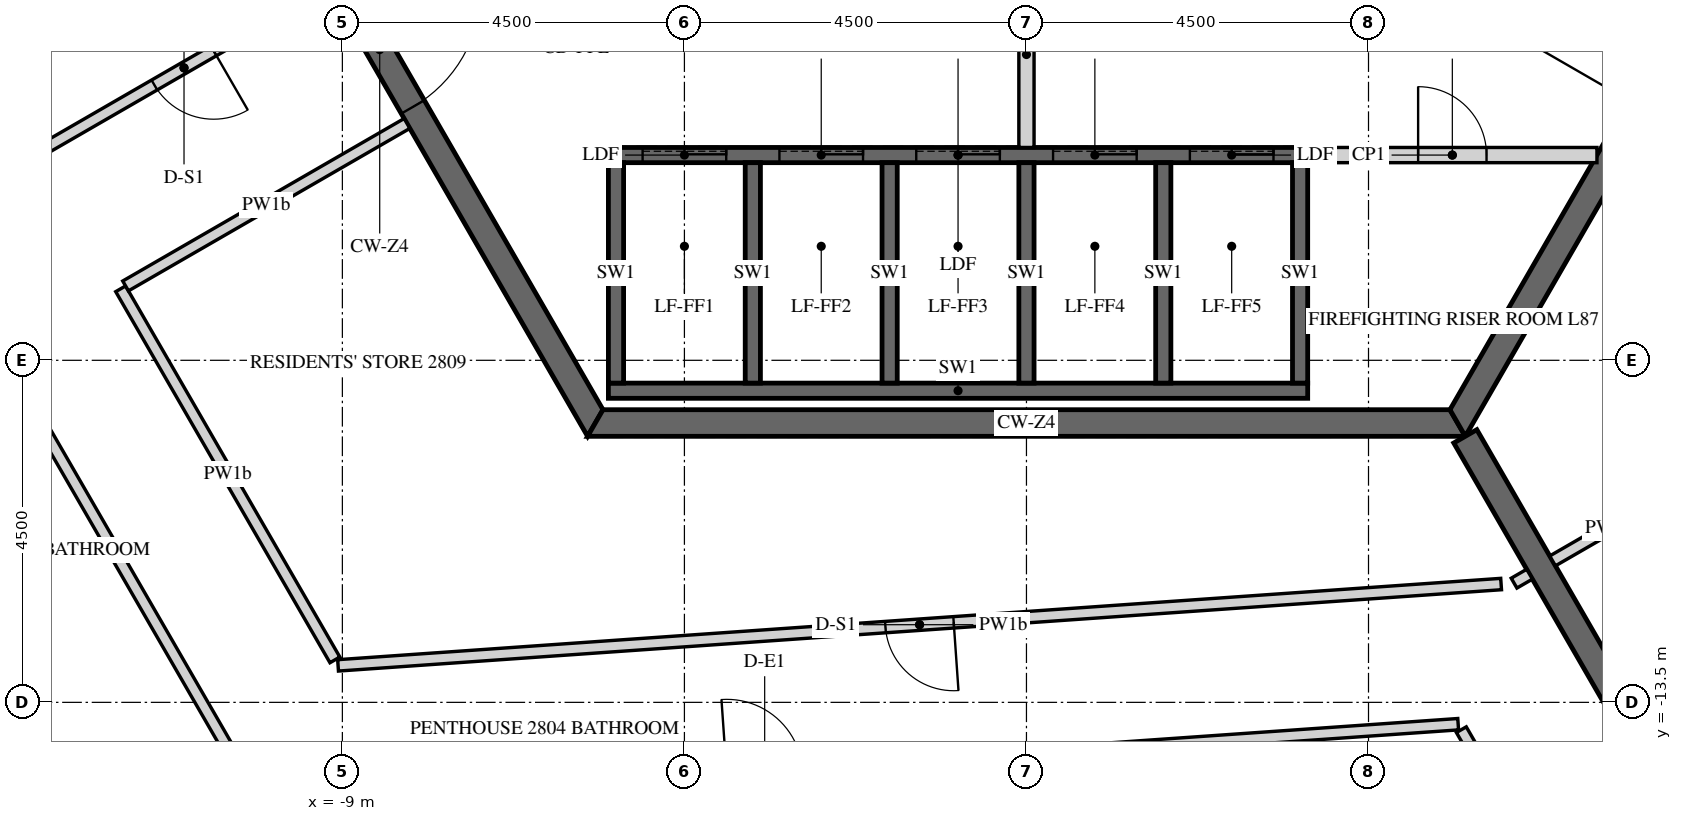
"""IFC4 building model, lengths in metres.
Left out: names, types, materials, properties, quantities, classifications, styles, units other than length and angle.
Written with IfcOpenShell. Run it as: python <this file> out.ifc"""

import sys

from ifc_helpers import new_model, si_unit, direction, frame, frame_2d, origin, place, context, subcontext, project, spatial, polyline, rectangle, outline, extrude, element, fill, save


model = new_model("IFC4")
c1 = context("Model", 3, precision=1e-05, world=origin(), true_north=direction((0.0, 1.0)))
c2 = subcontext(c1, "Body", "Model", "MODEL_VIEW")
j1 = project(units=[si_unit("LENGTHUNIT", "METRE"), si_unit("PLANEANGLEUNIT", "RADIAN")], contexts=[c1])
p1 = place(None, origin())
s1 = spatial("IfcSite", under=j1, at=p1, CompositionType="ELEMENT")
p2 = place(p1, origin())
s2 = spatial("IfcBuilding", under=s1, at=p2, CompositionType="ELEMENT")
p3 = place(p2, frame((0.0, 0.0, 361.2)))
s3 = spatial("IfcBuildingStorey", under=s2, at=p3, CompositionType="ELEMENT", Elevation=361.2)
p4 = place(p3, frame((-11.345, 0.0, -0.15), z_axis=(0.0, 0.0, 1.0), x_axis=(0.499995046907, -0.866028263435, 0.0)))
e1 = element("IfcWall", 1, at=p4, inside=s3, PredefinedType="SHEAR", context=c2, shape_type="SweptSolid", body=[
    extrude(outline(polyline([(-0.101, -0.175), (11.446, -0.175), (11.244, 0.175), (0.101, 0.175), (-0.101, -0.175)])), origin(), (0.0, 0.0, 1.0), 3.9),
])
p5 = place(p4, frame((4.744, 0.0, 0.15)))
e2 = element("IfcOpeningElement", 2, at=p5, cuts=e1, PredefinedType="OPENING", context=c2, shape_type="SweptSolid", body=[
    extrude(rectangle(XDim=1.8, YDim=2.4, at=frame_2d((0.9, 1.2))), frame((0.0, 0.185, 0.0), z_axis=(0.0, -1.0, 0.0), x_axis=(1.0, 0.0, 0.0)), (0.0, 0.0, 1.0), 0.37),
])
p6 = place(p3, frame((-5.673, -9.825, -0.15), z_axis=(0.0, 0.0, 1.0), x_axis=(1.0, 0.0, 0.0)))
e3 = element("IfcWall", 3, at=p6, inside=s3, PredefinedType="SHEAR", context=c2, shape_type="SweptSolid", body=[
    extrude(outline(polyline([(-0.101, -0.175), (11.446, -0.175), (11.244, 0.175), (0.101, 0.175), (-0.101, -0.175)])), origin(), (0.0, 0.0, 1.0), 3.9),
])
p7 = place(p3, frame((5.673, -9.825, -0.15), z_axis=(0.0, 0.0, 1.0), x_axis=(0.499995046907, 0.866028263435, 0.0)))
e4 = element("IfcWall", 4, at=p7, inside=s3, PredefinedType="SHEAR", context=c2, shape_type="SweptSolid", body=[
    extrude(outline(polyline([(-0.101, -0.175), (11.446, -0.175), (11.244, 0.175), (0.101, 0.175), (-0.101, -0.175)])), origin(), (0.0, 0.0, 1.0), 3.9),
])
p8 = place(p7, frame((4.801, 0.0, 0.15)))
e5 = element("IfcOpeningElement", 5, at=p8, cuts=e4, PredefinedType="OPENING", context=c2, shape_type="SweptSolid", body=[
    extrude(rectangle(XDim=1.8, YDim=2.4, at=frame_2d((0.9, 1.2))), frame((0.0, 0.185, 0.0), z_axis=(0.0, -1.0, 0.0), x_axis=(1.0, 0.0, 0.0)), (0.0, 0.0, 1.0), 0.37),
])
p9 = place(p3, frame((5.773, -10.0, -0.15), z_axis=(0.0, 0.0, 1.0), x_axis=(0.500007911273, -0.866020836161, 0.0)))
e6 = element("IfcWall", 6, at=p9, inside=s3, PredefinedType="SHEAR", context=c2, shape_type="SweptSolid", body=[
    extrude(rectangle(XDim=14.51, YDim=0.35, at=frame_2d((7.255, 0.0))), origin(), (0.0, 0.0, 1.0), 3.9),
])
p10 = place(p9, frame((6.355, 0.0, 0.15)))
e7 = element("IfcOpeningElement", 7, at=p10, cuts=e6, PredefinedType="OPENING", context=c2, shape_type="SweptSolid", body=[
    extrude(rectangle(XDim=1.8, YDim=2.4, at=frame_2d((0.9, 1.2))), frame((0.0, 0.185, 0.0), z_axis=(0.0, -1.0, 0.0), x_axis=(1.0, 0.0, 0.0)), (0.0, 0.0, 1.0), 0.37),
])
p11 = place(p3, frame((-5.5, -6.3, -0.25), z_axis=(0.0, 0.0, 1.0), x_axis=(1.0, 0.0, 0.0)))
e8 = element("IfcWall", 8, at=p11, inside=s3, PredefinedType="SHEAR", context=c2, shape_type="SweptSolid", body=[
    extrude(rectangle(XDim=9.2, YDim=0.2, at=frame_2d((4.6, 0.0))), origin(), (0.0, 0.0, 1.0), 3.9),
])
p12 = place(p11, frame((0.45, 0.0, 0.25)))
e9 = element("IfcOpeningElement", 9, at=p12, cuts=e8, PredefinedType="OPENING", context=c2, shape_type="SweptSolid", body=[
    extrude(rectangle(XDim=1.1, YDim=2.1, at=frame_2d((0.55, 1.05))), frame((0.0, 0.11, 0.0), z_axis=(0.0, -1.0, 0.0), x_axis=(1.0, 0.0, 0.0)), (0.0, 0.0, 1.0), 0.22),
])
p13 = place(p11, frame((2.25, 0.0, 0.25)))
e10 = element("IfcOpeningElement", 10, at=p13, cuts=e8, PredefinedType="OPENING", context=c2, shape_type="SweptSolid", body=[
    extrude(rectangle(XDim=1.1, YDim=2.1, at=frame_2d((0.55, 1.05))), frame((0.0, 0.11, 0.0), z_axis=(0.0, -1.0, 0.0), x_axis=(1.0, 0.0, 0.0)), (0.0, 0.0, 1.0), 0.22),
])
p14 = place(p11, frame((4.05, 0.0, 0.25)))
e11 = element("IfcOpeningElement", 11, at=p14, cuts=e8, PredefinedType="OPENING", context=c2, shape_type="SweptSolid", body=[
    extrude(rectangle(XDim=1.1, YDim=2.1, at=frame_2d((0.55, 1.05))), frame((0.0, 0.11, 0.0), z_axis=(0.0, -1.0, 0.0), x_axis=(1.0, 0.0, 0.0)), (0.0, 0.0, 1.0), 0.22),
])
p15 = place(p11, frame((5.85, 0.0, 0.25)))
e12 = element("IfcOpeningElement", 12, at=p15, cuts=e8, PredefinedType="OPENING", context=c2, shape_type="SweptSolid", body=[
    extrude(rectangle(XDim=1.1, YDim=2.1, at=frame_2d((0.55, 1.05))), frame((0.0, 0.11, 0.0), z_axis=(0.0, -1.0, 0.0), x_axis=(1.0, 0.0, 0.0)), (0.0, 0.0, 1.0), 0.22),
])
p16 = place(p11, frame((7.65, 0.0, 0.25)))
e13 = element("IfcOpeningElement", 13, at=p16, cuts=e8, PredefinedType="OPENING", context=c2, shape_type="SweptSolid", body=[
    extrude(rectangle(XDim=1.1, YDim=2.1, at=frame_2d((0.55, 1.05))), frame((0.0, 0.11, 0.0), z_axis=(0.0, -1.0, 0.0), x_axis=(1.0, 0.0, 0.0)), (0.0, 0.0, 1.0), 0.22),
])
p17 = place(p3, frame((-5.5, -9.4, -0.25), z_axis=(0.0, 0.0, 1.0), x_axis=(1.0, 0.0, 0.0)))
e14 = element("IfcWall", 14, at=p17, inside=s3, PredefinedType="SHEAR", context=c2, shape_type="SweptSolid", body=[
    extrude(rectangle(XDim=9.2, YDim=0.2, at=frame_2d((4.6, 0.0))), origin(), (0.0, 0.0, 1.0), 3.9),
])
for number, where, z_axis, x_axis in (
    (15, (-5.4, -9.3, -0.25), (0.0, 0.0, 1.0), (0.0, 1.0, 0.0)),
    (16, (-3.6, -9.3, -0.25), (0.0, 0.0, 1.0), (0.0, 1.0, 0.0)),
    (17, (-1.8, -9.3, -0.25), (0.0, 0.0, 1.0), (0.0, 1.0, 0.0)),
    (18, (0.0, -9.3, -0.25), (0.0, 0.0, 1.0), (0.0, 1.0, 0.0)),
    (19, (1.8, -9.3, -0.25), (0.0, 0.0, 1.0), (0.0, 1.0, 0.0)),
    (20, (3.6, -9.3, -0.25), (0.0, 0.0, 1.0), (0.0, 1.0, 0.0)),
):
    element("IfcWall", number, at=place(p3, frame(where, z_axis=z_axis, x_axis=x_axis)), inside=s3, PredefinedType="SHEAR", context=c2, shape_type="SweptSolid", body=[
        extrude(rectangle(XDim=2.9, YDim=0.2, at=frame_2d((1.45, 0.0))), origin(), (0.0, 0.0, 1.0), 3.9),
    ])
p18 = place(p3, frame((0.0, -6.2, 0.0), z_axis=(0.0, 0.0, 1.0), x_axis=(0.0, 1.0, 0.0)))
e21 = element("IfcWall", 21, at=p18, inside=s3, PredefinedType="PARTITIONING", context=c2, shape_type="SweptSolid", body=[
    extrude(rectangle(XDim=6.1, YDim=0.2, at=frame_2d((3.05, 0.0))), origin(), (0.0, 0.0, 1.0), 3.65),
])
p19 = place(p3, frame((3.7, -6.3, 0.0), z_axis=(0.0, 0.0, 1.0), x_axis=(1.0, 0.0, 0.0)))
e22 = element("IfcWall", 22, at=p19, inside=s3, PredefinedType="PARTITIONING", context=c2, shape_type="SweptSolid", body=[
    extrude(rectangle(XDim=3.806, YDim=0.2, at=frame_2d((1.903, 0.0))), origin(), (0.0, 0.0, 1.0), 3.65),
])
p20 = place(p19, frame((1.453, 0.0, 0.0)))
e23 = element("IfcOpeningElement", 23, at=p20, cuts=e22, PredefinedType="OPENING", context=c2, shape_type="SweptSolid", body=[
    extrude(rectangle(XDim=0.9, YDim=2.1, at=frame_2d((0.45, 1.05))), frame((0.0, 0.11, 0.0), z_axis=(0.0, -1.0, 0.0), x_axis=(1.0, 0.0, 0.0)), (0.0, 0.0, 1.0), 0.22),
])
p21 = place(p3, frame((-17.036, -2.792, 0.0), z_axis=(0.0, 0.0, 1.0), x_axis=(0.500006428338, -0.86602169235, 0.0)))
e24 = element("IfcWall", 24, at=p21, inside=s3, PredefinedType="PARTITIONING", context=c2, shape_type="SweptSolid", body=[
    extrude(rectangle(XDim=13.966, YDim=0.15, at=frame_2d((6.983, 0.0))), origin(), (0.0, 0.0, 1.0), 2.82),
])
p22 = place(p21, frame((3.325, 0.0, 0.0)))
e25 = element("IfcOpeningElement", 25, at=p22, cuts=e24, PredefinedType="OPENING", context=c2, shape_type="SweptSolid", body=[
    extrude(rectangle(XDim=1.0, YDim=2.1, at=frame_2d((0.5, 1.05))), frame((0.0, 0.085, 0.0), z_axis=(0.0, -1.0, 0.0), x_axis=(1.0, 0.0, 0.0)), (0.0, 0.0, 1.0), 0.17),
])
p23 = place(p3, frame((-9.97, -14.882, 0.0), z_axis=(0.0, 0.0, 1.0), x_axis=(0.997564384496, 0.06975169378, 0.0)))
e26 = element("IfcWall", 26, at=p23, inside=s3, PredefinedType="PARTITIONING", context=c2, shape_type="SweptSolid", body=[
    extrude(rectangle(XDim=15.688, YDim=0.15, at=frame_2d((7.844, 0.0))), origin(), (0.0, 0.0, 1.0), 2.82),
])
p24 = place(p23, frame((6.042, 0.0, 0.0)))
e27 = element("IfcOpeningElement", 27, at=p24, cuts=e26, PredefinedType="OPENING", context=c2, shape_type="SweptSolid", body=[
    extrude(rectangle(XDim=1.0, YDim=2.1, at=frame_2d((0.5, 1.05))), frame((0.0, 0.085, 0.0), z_axis=(0.0, -1.0, 0.0), x_axis=(1.0, 0.0, 0.0)), (0.0, 0.0, 1.0), 0.17),
])
p25 = place(p3, frame((5.721, -13.86, 0.0), z_axis=(0.0, 0.0, 1.0), x_axis=(0.499970524249, -0.866042420948, 0.0)))
e28 = element("IfcWall", 28, at=p25, inside=s3, PredefinedType="PARTITIONING", context=c2, shape_type="SweptSolid", body=[
    extrude(rectangle(XDim=5.339, YDim=0.15, at=frame_2d((2.669, 0.0))), origin(), (0.0, 0.0, 1.0), 2.82),
])
p26 = place(p3, frame((-9.2, -4.066, 0.0), z_axis=(0.0, 0.0, 1.0), x_axis=(-0.866013608182, -0.500020430026, 0.0)))
e29 = element("IfcWall", 29, at=p26, inside=s3, PredefinedType="PARTITIONING", context=c2, shape_type="SweptSolid", body=[
    extrude(rectangle(XDim=4.35, YDim=0.15, at=frame_2d((2.175, 0.0))), origin(), (0.0, 0.0, 1.0), 2.82),
])
p27 = place(p26, frame((1.725, 0.0, 0.0)))
e30 = element("IfcOpeningElement", 30, at=p27, cuts=e29, PredefinedType="OPENING", context=c2, shape_type="SweptSolid", body=[
    extrude(rectangle(XDim=0.9, YDim=2.1, at=frame_2d((0.45, 1.05))), frame((0.0, 0.085, 0.0), z_axis=(0.0, -1.0, 0.0), x_axis=(1.0, 0.0, 0.0)), (0.0, 0.0, 1.0), 0.17),
])
p28 = place(p3, frame((6.619, -11.814, 0.0), z_axis=(0.0, 0.0, 1.0), x_axis=(-0.865544827262, -0.500831460673, 0.0)))
e31 = element("IfcWall", 31, at=p28, inside=s3, PredefinedType="PARTITIONING", context=c2, shape_type="SweptSolid", body=[
    extrude(rectangle(XDim=0.235, YDim=0.15, at=frame_2d((0.117, 0.0))), origin(), (0.0, 0.0, 1.0), 2.82),
])
p29 = place(p3, frame((6.245, -11.944, 0.0), z_axis=(0.0, 0.0, 1.0), x_axis=(-0.997564707029, -0.069747080866, 0.0)))
e32 = element("IfcWall", 32, at=p29, inside=s3, PredefinedType="PARTITIONING", context=c2, shape_type="SweptSolid", body=[
    extrude(rectangle(XDim=15.339, YDim=0.15, at=frame_2d((7.669, 0.0))), origin(), (0.0, 0.0, 1.0), 2.82),
])
p30 = place(p29, frame((7.219, 0.0, 0.0)))
e33 = element("IfcOpeningElement", 33, at=p30, cuts=e32, PredefinedType="OPENING", context=c2, shape_type="SweptSolid", body=[
    extrude(rectangle(XDim=0.9, YDim=2.1, at=frame_2d((0.45, 1.05))), frame((0.0, 0.085, 0.0), z_axis=(0.0, -1.0, 0.0), x_axis=(1.0, 0.0, 0.0)), (0.0, 0.0, 1.0), 0.17),
])
p31 = place(p3, frame((-9.098, -12.941, 0.0), z_axis=(0.0, 0.0, 1.0), x_axis=(-0.500009875128, 0.866019702301, 0.0)))
e34 = element("IfcWall", 34, at=p31, inside=s3, PredefinedType="PARTITIONING", context=c2, shape_type="SweptSolid", body=[
    extrude(rectangle(XDim=5.637, YDim=0.15, at=frame_2d((2.819, 0.0))), origin(), (0.0, 0.0, 1.0), 2.82),
])
p32 = place(p3, frame((-11.852, -8.022, 0.0), z_axis=(0.0, 0.0, 1.0), x_axis=(0.866038183914, 0.499977863513, 0.0)))
e35 = element("IfcWall", 35, at=p32, inside=s3, PredefinedType="PARTITIONING", context=c2, shape_type="SweptSolid", body=[
    extrude(rectangle(XDim=4.275, YDim=0.15, at=frame_2d((2.138, 0.0))), origin(), (0.0, 0.0, 1.0), 2.82),
])
p33 = place(p3, frame((8.416, -10.777, 0.0), z_axis=(0.0, 0.0, 1.0), x_axis=(-0.866074815912, -0.499914405916, 0.0)))
e36 = element("IfcWall", 36, at=p33, inside=s3, PredefinedType="PARTITIONING", context=c2, shape_type="SweptSolid", body=[
    extrude(rectangle(XDim=1.725, YDim=0.15, at=frame_2d((0.862, 0.0))), origin(), (0.0, 0.0, 1.0), 2.82),
])
p34 = place(p5, origin())
e37 = element("IfcDoor", 37, at=p34, inside=s3, OperationType="DOUBLE_DOOR_SINGLE_SWING", PredefinedType="DOOR", context=c2, shape_type="SweptSolid", body=[
    extrude(rectangle(XDim=1.8, YDim=2.4, at=frame_2d((0.9, 1.2))), frame((0.0, 0.025, 0.0), z_axis=(0.0, -1.0, 0.0), x_axis=(1.0, 0.0, 0.0)), (0.0, 0.0, 1.0), 0.05),
])
fill(e2, e37)
p35 = place(p20, origin())
e38 = element("IfcDoor", 38, at=p35, inside=s3, OperationType="SINGLE_SWING_LEFT", PredefinedType="DOOR", context=c2, shape_type="SweptSolid", body=[
    extrude(rectangle(XDim=0.9, YDim=2.1, at=frame_2d((0.45, 1.05))), frame((0.0, 0.025, 0.0), z_axis=(0.0, -1.0, 0.0), x_axis=(1.0, 0.0, 0.0)), (0.0, 0.0, 1.0), 0.05),
])
fill(e23, e38)
p36 = place(p12, origin())
e39 = element("IfcDoor", 39, at=p36, inside=s3, OperationType="SLIDING_TO_LEFT", PredefinedType="DOOR", context=c2, shape_type="SweptSolid", body=[
    extrude(rectangle(XDim=1.1, YDim=2.1, at=frame_2d((0.55, 1.05))), frame((0.0, 0.025, 0.0), z_axis=(0.0, -1.0, 0.0), x_axis=(1.0, 0.0, 0.0)), (0.0, 0.0, 1.0), 0.05),
])
fill(e9, e39)
p37 = place(p13, origin())
e40 = element("IfcDoor", 40, at=p37, inside=s3, OperationType="SLIDING_TO_LEFT", PredefinedType="DOOR", context=c2, shape_type="SweptSolid", body=[
    extrude(rectangle(XDim=1.1, YDim=2.1, at=frame_2d((0.55, 1.05))), frame((0.0, 0.025, 0.0), z_axis=(0.0, -1.0, 0.0), x_axis=(1.0, 0.0, 0.0)), (0.0, 0.0, 1.0), 0.05),
])
fill(e10, e40)
p38 = place(p14, origin())
e41 = element("IfcDoor", 41, at=p38, inside=s3, OperationType="SLIDING_TO_LEFT", PredefinedType="DOOR", context=c2, shape_type="SweptSolid", body=[
    extrude(rectangle(XDim=1.1, YDim=2.1, at=frame_2d((0.55, 1.05))), frame((0.0, 0.025, 0.0), z_axis=(0.0, -1.0, 0.0), x_axis=(1.0, 0.0, 0.0)), (0.0, 0.0, 1.0), 0.05),
])
fill(e11, e41)
p39 = place(p15, origin())
e42 = element("IfcDoor", 42, at=p39, inside=s3, OperationType="SLIDING_TO_LEFT", PredefinedType="DOOR", context=c2, shape_type="SweptSolid", body=[
    extrude(rectangle(XDim=1.1, YDim=2.1, at=frame_2d((0.55, 1.05))), frame((0.0, 0.025, 0.0), z_axis=(0.0, -1.0, 0.0), x_axis=(1.0, 0.0, 0.0)), (0.0, 0.0, 1.0), 0.05),
])
fill(e12, e42)
p40 = place(p16, origin())
e43 = element("IfcDoor", 43, at=p40, inside=s3, OperationType="SLIDING_TO_LEFT", PredefinedType="DOOR", context=c2, shape_type="SweptSolid", body=[
    extrude(rectangle(XDim=1.1, YDim=2.1, at=frame_2d((0.55, 1.05))), frame((0.0, 0.025, 0.0), z_axis=(0.0, -1.0, 0.0), x_axis=(1.0, 0.0, 0.0)), (0.0, 0.0, 1.0), 0.05),
])
fill(e13, e43)
p41 = place(p27, origin())
e44 = element("IfcDoor", 44, at=p41, inside=s3, OperationType="SINGLE_SWING_LEFT", PredefinedType="DOOR", context=c2, shape_type="SweptSolid", body=[
    extrude(rectangle(XDim=0.9, YDim=2.1, at=frame_2d((0.45, 1.05))), frame((0.0, 0.025, 0.0), z_axis=(0.0, -1.0, 0.0), x_axis=(1.0, 0.0, 0.0)), (0.0, 0.0, 1.0), 0.05),
])
fill(e30, e44)
p42 = place(p30, origin())
e45 = element("IfcDoor", 45, at=p42, inside=s3, OperationType="SINGLE_SWING_RIGHT", PredefinedType="DOOR", context=c2, shape_type="SweptSolid", body=[
    extrude(rectangle(XDim=0.9, YDim=2.1, at=frame_2d((0.45, 1.05))), frame((0.0, 0.025, 0.0), z_axis=(0.0, -1.0, 0.0), x_axis=(1.0, 0.0, 0.0)), (0.0, 0.0, 1.0), 0.05),
])
fill(e33, e45)
save(model, sys.argv[1])
